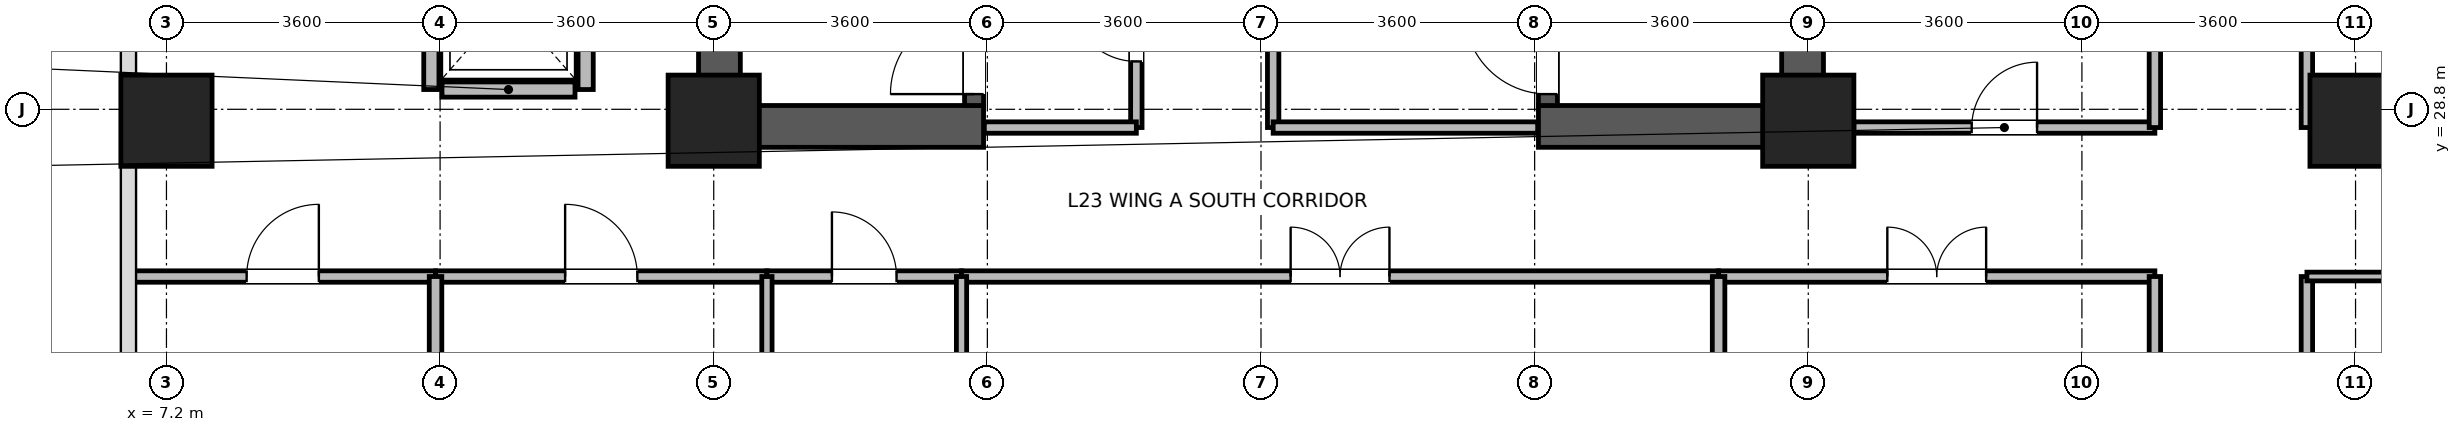
"""IFC4 building model, lengths in metres.
Left out: names, types, materials, properties, quantities, classifications, styles, units other than length and angle.
Written with IfcOpenShell. Run it as: python <this file> out.ifc"""

import sys

from ifc_helpers import new_model, si_unit, direction, frame, frame_2d, origin, origin_2d, place, context, subcontext, project, spatial, rectangle, extrude, source, transform, mapped, element, fill, save


model = new_model("IFC4")
c1 = context("Model", 3, precision=1e-05, world=origin(), true_north=direction((0.0, 1.0)))
c2 = subcontext(c1, "Body", "Model", "MODEL_VIEW")
j1 = project(units=[si_unit("LENGTHUNIT", "METRE"), si_unit("PLANEANGLEUNIT", "RADIAN")], contexts=[c1])
p1 = place(None, origin())
s1 = spatial("IfcSite", under=j1, at=p1, CompositionType="ELEMENT")
p2 = place(p1, origin())
s2 = spatial("IfcBuilding", under=s1, at=p2, CompositionType="ELEMENT")
p3 = place(p2, frame((0.0, 0.0, 93.4)))
s3 = spatial("IfcBuildingStorey", under=s2, at=p3, CompositionType="ELEMENT", Elevation=93.4)
for number, where, z_axis, x_axis in (
    (1, (14.475, 28.3, 0.0), (0.0, 0.0, 1.0), (0.0, 1.0, 0.0)),
    (2, (28.725, 28.3, 0.0), (0.0, 0.0, 1.0), (0.0, 1.0, 0.0)),
):
    element("IfcWall", number, at=place(p3, frame(where, z_axis=z_axis, x_axis=x_axis)), inside=s3, PredefinedType="SHEAR", context=c2, shape_type="SweptSolid", body=[
        extrude(rectangle(XDim=8.1, YDim=0.55, at=frame_2d((4.05, 0.0))), origin(), (0.0, 0.0, 1.0), 3.45),
    ])
for number, where, z_axis, x_axis in (
    (3, (14.75, 28.575, 0.0), (0.0, 0.0, 1.0), (1.0, 0.0, 0.0)),
    (4, (25.25, 28.575, 0.0), (0.0, 0.0, 1.0), (1.0, 0.0, 0.0)),
):
    element("IfcWall", number, at=place(p3, frame(where, z_axis=z_axis, x_axis=x_axis)), inside=s3, PredefinedType="SHEAR", context=c2, shape_type="SweptSolid", body=[
        extrude(rectangle(XDim=3.2, YDim=0.55, at=frame_2d((1.6, 0.0))), origin(), (0.0, 0.0, 1.0), 3.45),
    ])
p4 = place(p3, frame((17.825, 28.85, 0.0), z_axis=(0.0, 0.0, 1.0), x_axis=(0.0, 1.0, 0.0)))
e5 = element("IfcWall", 5, at=p4, inside=s3, PredefinedType="SHEAR", context=c2, shape_type="SweptSolid", body=[
    extrude(rectangle(XDim=7.0, YDim=0.25, at=frame_2d((3.5, 0.0))), origin(), (0.0, 0.0, 1.0), 3.45),
])
p5 = place(p4, frame((0.15, 0.0, 0.0)))
e6 = element("IfcOpeningElement", 6, at=p5, cuts=e5, PredefinedType="OPENING", context=c2, shape_type="SweptSolid", body=[
    extrude(rectangle(XDim=1.1, YDim=2.08, at=frame_2d((0.55, 1.04))), frame((0.0, 0.135, 0.0), z_axis=(0.0, -1.0, 0.0), x_axis=(1.0, 0.0, 0.0)), (0.0, 0.0, 1.0), 0.27),
])
p6 = place(p3, frame((25.375, 28.85, 0.0), z_axis=(0.0, 0.0, 1.0), x_axis=(0.0, 1.0, 0.0)))
e7 = element("IfcWall", 7, at=p6, inside=s3, PredefinedType="SHEAR", context=c2, shape_type="SweptSolid", body=[
    extrude(rectangle(XDim=7.0, YDim=0.25, at=frame_2d((3.5, 0.0))), origin(), (0.0, 0.0, 1.0), 3.45),
])
p7 = place(p6, frame((0.15, 0.0, 0.0)))
e8 = element("IfcOpeningElement", 8, at=p7, cuts=e7, PredefinedType="OPENING", context=c2, shape_type="SweptSolid", body=[
    extrude(rectangle(XDim=1.1, YDim=2.08, at=frame_2d((0.55, 1.04))), frame((0.0, 0.135, 0.0), z_axis=(0.0, -1.0, 0.0), x_axis=(1.0, 0.0, 0.0)), (0.0, 0.0, 1.0), 0.27),
])
m1 = source(origin(), c2, "Body", "SweptSolid", [
    extrude(rectangle(XDim=1.2, YDim=1.2, at=origin_2d()), origin(), (0.0, 0.0, 1.0), 3.7),
])
for number, where, z_axis, x_axis in (
    (9, (7.2, 28.65, 0.0), (0.0, 0.0, 1.0), (1.0, 0.0, 0.0)),
    (10, (14.4, 28.65, 0.0), (0.0, 0.0, 1.0), (1.0, 0.0, 0.0)),
    (11, (28.8, 28.65, 0.0), (0.0, 0.0, 1.0), (1.0, 0.0, 0.0)),
    (12, (36.0, 28.65, 0.0), (0.0, 0.0, 1.0), (1.0, 0.0, 0.0)),
):
    element("IfcColumn", number, at=place(p3, frame(where, z_axis=z_axis, x_axis=x_axis)), inside=s3, PredefinedType="COLUMN", context=c2, shape_type="MappedRepresentation", body=[
        mapped(m1, transform((0.0, 0.0, 0.0), x_axis=(1.0, 0.0, 0.0), y_axis=(0.0, 1.0, 0.0), z_axis=(0.0, 0.0, 1.0), scale=1.0)),
    ])
p8 = place(p3, frame((10.825, 29.06, 0.0), z_axis=(0.0, 0.0, 1.0), x_axis=(1.0, 0.0, 0.0)))
e13 = element("IfcWall", 13, at=p8, inside=s3, PredefinedType="PARTITIONING", context=c2, shape_type="SweptSolid", body=[
    extrude(rectangle(XDim=1.75, YDim=0.2, at=frame_2d((0.875, 0.0))), origin(), (0.0, 0.0, 1.0), 3.43),
])
for number, where, z_axis, x_axis in (
    (14, (10.685, 29.06, 0.0), (0.0, 0.0, 1.0), (0.0, 1.0, 0.0)),
    (15, (12.715, 29.06, 0.0), (0.0, 0.0, 1.0), (0.0, 1.0, 0.0)),
):
    element("IfcWall", number, at=place(p3, frame(where, z_axis=z_axis, x_axis=x_axis)), inside=s3, PredefinedType="PARTITIONING", context=c2, shape_type="SweptSolid", body=[
        extrude(rectangle(XDim=2.28, YDim=0.2, at=frame_2d((1.14, 0.0))), origin(), (0.0, 0.0, 1.0), 3.43),
    ])
p9 = place(p3, frame((17.66, 26.6, 0.0), z_axis=(0.0, 0.0, 1.0), x_axis=(1.0, 0.0, 0.0)))
e16 = element("IfcWall", 16, at=p9, inside=s3, PredefinedType="PARTITIONING", context=c2, shape_type="SweptSolid", body=[
    extrude(rectangle(XDim=9.96, YDim=0.15, at=frame_2d((4.98, 0.0))), origin(), (0.0, 0.0, 1.0), 3.43),
])
p10 = place(p9, frame((4.33, 0.0, 0.0)))
e17 = element("IfcOpeningElement", 17, at=p10, cuts=e16, PredefinedType="OPENING", context=c2, shape_type="SweptSolid", body=[
    extrude(rectangle(XDim=1.3, YDim=2.12, at=frame_2d((0.65, 1.06))), frame((0.0, 0.085, 0.0), z_axis=(0.0, -1.0, 0.0), x_axis=(1.0, 0.0, 0.0)), (0.0, 0.0, 1.0), 0.17),
])
p11 = place(p3, frame((35.36, 16.96, 0.0), z_axis=(0.0, 0.0, 1.0), x_axis=(0.0, 1.0, 0.0)))
e18 = element("IfcWall", 18, at=p11, inside=s3, PredefinedType="PARTITIONING", context=c2, shape_type="SweptSolid", body=[
    extrude(rectangle(XDim=9.64, YDim=0.15, at=frame_2d((4.82, 0.0))), origin(), (0.0, 0.0, 1.0), 3.43),
])
p12 = place(p11, frame((2.435, 0.0, 0.0)))
e19 = element("IfcOpeningElement", 19, at=p12, cuts=e18, PredefinedType="OPENING", context=c2, shape_type="SweptSolid", body=[
    extrude(rectangle(XDim=1.3, YDim=2.12, at=frame_2d((0.65, 1.06))), frame((0.0, 0.085, 0.0), z_axis=(0.0, -1.0, 0.0), x_axis=(1.0, 0.0, 0.0)), (0.0, 0.0, 1.0), 0.17),
])
p13 = place(p3, frame((35.36, 28.56, 0.0), z_axis=(0.0, 0.0, 1.0), x_axis=(0.0, 1.0, 0.0)))
e20 = element("IfcWall", 20, at=p13, inside=s3, PredefinedType="PARTITIONING", context=c2, shape_type="SweptSolid", body=[
    extrude(rectangle(XDim=7.68, YDim=0.15, at=frame_2d((3.84, 0.0))), origin(), (0.0, 0.0, 1.0), 3.43),
])
p14 = place(p13, frame((3.19, 0.0, 0.0)))
e21 = element("IfcOpeningElement", 21, at=p14, cuts=e20, PredefinedType="OPENING", context=c2, shape_type="SweptSolid", body=[
    extrude(rectangle(XDim=1.3, YDim=2.12, at=frame_2d((0.65, 1.06))), frame((0.0, 0.085, 0.0), z_axis=(0.0, -1.0, 0.0), x_axis=(1.0, 0.0, 0.0)), (0.0, 0.0, 1.0), 0.17),
])
p15 = place(p3, frame((27.62, 26.6, 0.0), z_axis=(0.0, 0.0, 1.0), x_axis=(1.0, 0.0, 0.0)))
e22 = element("IfcWall", 22, at=p15, inside=s3, PredefinedType="PARTITIONING", context=c2, shape_type="SweptSolid", body=[
    extrude(rectangle(XDim=5.74, YDim=0.15, at=frame_2d((2.87, 0.0))), origin(), (0.0, 0.0, 1.0), 3.43),
])
p16 = place(p15, frame((2.22, 0.0, 0.0)))
e23 = element("IfcOpeningElement", 23, at=p16, cuts=e22, PredefinedType="OPENING", context=c2, shape_type="SweptSolid", body=[
    extrude(rectangle(XDim=1.3, YDim=2.12, at=frame_2d((0.65, 1.06))), frame((0.0, 0.085, 0.0), z_axis=(0.0, -1.0, 0.0), x_axis=(1.0, 0.0, 0.0)), (0.0, 0.0, 1.0), 0.17),
])
p17 = place(p3, frame((33.36, 21.6, 0.0), z_axis=(0.0, 0.0, 1.0), x_axis=(0.0, 1.0, 0.0)))
e24 = element("IfcWall", 24, at=p17, inside=s3, PredefinedType="PARTITIONING", context=c2, shape_type="SweptSolid", body=[
    extrude(rectangle(XDim=5.0, YDim=0.15, at=frame_2d((2.5, 0.0))), origin(), (0.0, 0.0, 1.0), 3.43),
])
p18 = place(p3, frame((29.4, 28.56, 0.0), z_axis=(0.0, 0.0, 1.0), x_axis=(1.0, 0.0, 0.0)))
e25 = element("IfcWall", 25, at=p18, inside=s3, PredefinedType="PARTITIONING", context=c2, shape_type="SweptSolid", body=[
    extrude(rectangle(XDim=3.96, YDim=0.15, at=frame_2d((1.98, 0.0))), origin(), (0.0, 0.0, 1.0), 2.78),
])
p19 = place(p18, frame((1.55, 0.0, 0.0)))
e26 = element("IfcOpeningElement", 26, at=p19, cuts=e25, PredefinedType="OPENING", context=c2, shape_type="SweptSolid", body=[
    extrude(rectangle(XDim=0.86, YDim=2.02, at=frame_2d((0.43, 1.01))), frame((0.0, 0.085, 0.0), z_axis=(0.0, -1.0, 0.0), x_axis=(1.0, 0.0, 0.0)), (0.0, 0.0, 1.0), 0.17),
])
p20 = place(p3, frame((10.74, 26.6, 0.0), z_axis=(0.0, 0.0, 1.0), x_axis=(1.0, 0.0, 0.0)))
e27 = element("IfcWall", 27, at=p20, inside=s3, PredefinedType="PARTITIONING", context=c2, shape_type="SweptSolid", body=[
    extrude(rectangle(XDim=4.36, YDim=0.15, at=frame_2d((2.18, 0.0))), origin(), (0.0, 0.0, 1.0), 3.43),
])
p21 = place(p20, frame((1.705, 0.0, 0.0)))
e28 = element("IfcOpeningElement", 28, at=p21, cuts=e27, PredefinedType="OPENING", context=c2, shape_type="SweptSolid", body=[
    extrude(rectangle(XDim=0.95, YDim=2.1, at=frame_2d((0.475, 1.05))), frame((0.0, 0.085, 0.0), z_axis=(0.0, -1.0, 0.0), x_axis=(1.0, 0.0, 0.0)), (0.0, 0.0, 1.0), 0.17),
])
p22 = place(p3, frame((6.72, 26.6, 0.0), z_axis=(0.0, 0.0, 1.0), x_axis=(1.0, 0.0, 0.0)))
e29 = element("IfcWall", 29, at=p22, inside=s3, PredefinedType="PARTITIONING", context=c2, shape_type="SweptSolid", body=[
    extrude(rectangle(XDim=4.02, YDim=0.15, at=frame_2d((2.01, 0.0))), origin(), (0.0, 0.0, 1.0), 3.43),
])
p23 = place(p22, frame((1.535, 0.0, 0.0)))
e30 = element("IfcOpeningElement", 30, at=p23, cuts=e29, PredefinedType="OPENING", context=c2, shape_type="SweptSolid", body=[
    extrude(rectangle(XDim=0.95, YDim=2.1, at=frame_2d((0.475, 1.05))), frame((0.0, 0.085, 0.0), z_axis=(0.0, -1.0, 0.0), x_axis=(1.0, 0.0, 0.0)), (0.0, 0.0, 1.0), 0.17),
])
p24 = place(p3, frame((33.36, 28.56, 0.0), z_axis=(0.0, 0.0, 1.0), x_axis=(0.0, 1.0, 0.0)))
e31 = element("IfcWall", 31, at=p24, inside=s3, PredefinedType="PARTITIONING", context=c2, shape_type="SweptSolid", body=[
    extrude(rectangle(XDim=3.84, YDim=0.15, at=frame_2d((1.92, 0.0))), origin(), (0.0, 0.0, 1.0), 3.43),
])
p25 = place(p3, frame((19.96, 28.56, 0.0), z_axis=(0.0, 0.0, 1.0), x_axis=(0.0, 1.0, 0.0)))
e32 = element("IfcWall", 32, at=p25, inside=s3, PredefinedType="PARTITIONING", context=c2, shape_type="SweptSolid", body=[
    extrude(rectangle(XDim=2.6, YDim=0.15, at=frame_2d((1.3, 0.0))), origin(), (0.0, 0.0, 1.0), 3.43),
])
p26 = place(p25, frame((0.87, 0.0, 0.0)))
e33 = element("IfcOpeningElement", 33, at=p26, cuts=e32, PredefinedType="OPENING", context=c2, shape_type="SweptSolid", body=[
    extrude(rectangle(XDim=0.86, YDim=2.02, at=frame_2d((0.43, 1.01))), frame((0.0, 0.085, 0.0), z_axis=(0.0, -1.0, 0.0), x_axis=(1.0, 0.0, 0.0)), (0.0, 0.0, 1.0), 0.17),
])
p27 = place(p3, frame((15.1, 26.6, 0.0), z_axis=(0.0, 0.0, 1.0), x_axis=(1.0, 0.0, 0.0)))
e34 = element("IfcWall", 34, at=p27, inside=s3, PredefinedType="PARTITIONING", context=c2, shape_type="SweptSolid", body=[
    extrude(rectangle(XDim=2.56, YDim=0.15, at=frame_2d((1.28, 0.0))), origin(), (0.0, 0.0, 1.0), 3.43),
])
p28 = place(p27, frame((0.855, 0.0, 0.0)))
e35 = element("IfcOpeningElement", 35, at=p28, cuts=e34, PredefinedType="OPENING", context=c2, shape_type="SweptSolid", body=[
    extrude(rectangle(XDim=0.85, YDim=2.04, at=frame_2d((0.425, 1.02))), frame((0.0, 0.085, 0.0), z_axis=(0.0, -1.0, 0.0), x_axis=(1.0, 0.0, 0.0)), (0.0, 0.0, 1.0), 0.17),
])
p29 = place(p3, frame((17.96, 28.56, 0.0), z_axis=(0.0, 0.0, 1.0), x_axis=(1.0, 0.0, 0.0)))
e36 = element("IfcWall", 36, at=p29, inside=s3, PredefinedType="PARTITIONING", context=c2, shape_type="SweptSolid", body=[
    extrude(rectangle(XDim=2.0, YDim=0.15, at=frame_2d((1.0, 0.0))), origin(), (0.0, 0.0, 1.0), 2.23),
])
p30 = place(p3, frame((10.74, 21.732, 0.0), z_axis=(0.0, 0.0, 1.0), x_axis=(0.0, 1.0, 0.0)))
e37 = element("IfcWall", 37, at=p30, inside=s3, PredefinedType="PARTITIONING", context=c2, shape_type="SweptSolid", body=[
    extrude(rectangle(XDim=4.868, YDim=0.165, at=frame_2d((2.434, 0.0))), origin(), (0.0, 0.0, 1.0), 3.43),
])
for number, where, z_axis, x_axis in (
    (38, (15.1, 21.732, 0.0), (0.0, 0.0, 1.0), (0.0, 1.0, 0.0)),
    (39, (17.66, 21.732, 0.0), (0.0, 0.0, 1.0), (0.0, 1.0, 0.0)),
):
    element("IfcWall", number, at=place(p3, frame(where, z_axis=z_axis, x_axis=x_axis)), inside=s3, PredefinedType="PARTITIONING", context=c2, shape_type="SweptSolid", body=[
        extrude(rectangle(XDim=4.868, YDim=0.135, at=frame_2d((2.434, 0.0))), origin(), (0.0, 0.0, 1.0), 3.43),
    ])
p31 = place(p3, frame((27.62, 21.732, 0.0), z_axis=(0.0, 0.0, 1.0), x_axis=(0.0, 1.0, 0.0)))
e40 = element("IfcWall", 40, at=p31, inside=s3, PredefinedType="PARTITIONING", context=c2, shape_type="SweptSolid", body=[
    extrude(rectangle(XDim=4.868, YDim=0.165, at=frame_2d((2.434, 0.0))), origin(), (0.0, 0.0, 1.0), 3.43),
])
p32 = place(p3, frame((21.76, 28.56, 0.0), z_axis=(0.0, 0.0, 1.0), x_axis=(0.0, 1.0, 0.0)))
e41 = element("IfcWall", 41, at=p32, inside=s3, PredefinedType="PARTITIONING", context=c2, shape_type="SweptSolid", body=[
    extrude(rectangle(XDim=4.6, YDim=0.15, at=frame_2d((2.3, 0.0))), origin(), (0.0, 0.0, 1.0), 3.43),
])
p33 = place(p32, frame((1.55, 0.0, 0.0)))
e42 = element("IfcOpeningElement", 42, at=p33, cuts=e41, PredefinedType="OPENING", context=c2, shape_type="SweptSolid", body=[
    extrude(rectangle(XDim=1.5, YDim=2.1, at=frame_2d((0.75, 1.05))), frame((0.0, 0.085, 0.0), z_axis=(0.0, -1.0, 0.0), x_axis=(1.0, 0.0, 0.0)), (0.0, 0.0, 1.0), 0.17),
])
p34 = place(p3, frame((35.36, 26.6, 0.0), z_axis=(0.0, 0.0, 1.0), x_axis=(1.0, 0.0, 0.0)))
e43 = element("IfcWall", 43, at=p34, inside=s3, PredefinedType="PARTITIONING", context=c2, shape_type="SweptSolid", body=[
    extrude(rectangle(XDim=4.18, YDim=0.115, at=frame_2d((2.09, 0.0))), origin(), (0.0, 0.0, 1.0), 3.43),
])
p35 = place(p3, frame((21.76, 28.56, 0.0), z_axis=(0.0, 0.0, 1.0), x_axis=(1.0, 0.0, 0.0)))
e44 = element("IfcWall", 44, at=p35, inside=s3, PredefinedType="PARTITIONING", context=c2, shape_type="SweptSolid", body=[
    extrude(rectangle(XDim=3.48, YDim=0.15, at=frame_2d((1.74, 0.0))), origin(), (0.0, 0.0, 1.0), 2.23),
])
p36 = place(p5, origin())
e45 = element("IfcDoor", 45, at=p36, inside=s3, OperationType="SINGLE_SWING_LEFT", PredefinedType="DOOR", context=c2, shape_type="SweptSolid", body=[
    extrude(rectangle(XDim=1.1, YDim=2.08, at=frame_2d((0.55, 1.04))), frame((0.0, 0.025, 0.0), z_axis=(0.0, -1.0, 0.0), x_axis=(1.0, 0.0, 0.0)), (0.0, 0.0, 1.0), 0.05),
])
fill(e6, e45)
p37 = place(p7, origin())
e46 = element("IfcDoor", 46, at=p37, inside=s3, OperationType="SINGLE_SWING_RIGHT", PredefinedType="DOOR", context=c2, shape_type="SweptSolid", body=[
    extrude(rectangle(XDim=1.1, YDim=2.08, at=frame_2d((0.55, 1.04))), frame((0.0, 0.025, 0.0), z_axis=(0.0, -1.0, 0.0), x_axis=(1.0, 0.0, 0.0)), (0.0, 0.0, 1.0), 0.05),
])
fill(e8, e46)
p38 = place(p10, origin())
e47 = element("IfcDoor", 47, at=p38, inside=s3, OperationType="DOUBLE_DOOR_SINGLE_SWING", PredefinedType="DOOR", context=c2, shape_type="SweptSolid", body=[
    extrude(rectangle(XDim=1.3, YDim=2.12, at=frame_2d((0.65, 1.06))), frame((0.0, 0.025, 0.0), z_axis=(0.0, -1.0, 0.0), x_axis=(1.0, 0.0, 0.0)), (0.0, 0.0, 1.0), 0.05),
])
fill(e17, e47)
p39 = place(p16, origin())
e48 = element("IfcDoor", 48, at=p39, inside=s3, OperationType="DOUBLE_DOOR_SINGLE_SWING", PredefinedType="DOOR", context=c2, shape_type="SweptSolid", body=[
    extrude(rectangle(XDim=1.3, YDim=2.12, at=frame_2d((0.65, 1.06))), frame((0.0, 0.025, 0.0), z_axis=(0.0, -1.0, 0.0), x_axis=(1.0, 0.0, 0.0)), (0.0, 0.0, 1.0), 0.05),
])
fill(e23, e48)
p40 = place(p19, origin())
e49 = element("IfcDoor", 49, at=p40, inside=s3, OperationType="SINGLE_SWING_RIGHT", PredefinedType="DOOR", context=c2, shape_type="SweptSolid", body=[
    extrude(rectangle(XDim=0.86, YDim=2.02, at=frame_2d((0.43, 1.01))), frame((0.0, 0.025, 0.0), z_axis=(0.0, -1.0, 0.0), x_axis=(1.0, 0.0, 0.0)), (0.0, 0.0, 1.0), 0.05),
])
fill(e26, e49)
p41 = place(p21, origin())
e50 = element("IfcDoor", 50, at=p41, inside=s3, OperationType="SINGLE_SWING_LEFT", PredefinedType="DOOR", context=c2, shape_type="SweptSolid", body=[
    extrude(rectangle(XDim=0.95, YDim=2.1, at=frame_2d((0.475, 1.05))), frame((0.0, 0.025, 0.0), z_axis=(0.0, -1.0, 0.0), x_axis=(1.0, 0.0, 0.0)), (0.0, 0.0, 1.0), 0.05),
])
fill(e28, e50)
p42 = place(p23, origin())
e51 = element("IfcDoor", 51, at=p42, inside=s3, OperationType="SINGLE_SWING_RIGHT", PredefinedType="DOOR", context=c2, shape_type="SweptSolid", body=[
    extrude(rectangle(XDim=0.95, YDim=2.1, at=frame_2d((0.475, 1.05))), frame((0.0, 0.025, 0.0), z_axis=(0.0, -1.0, 0.0), x_axis=(1.0, 0.0, 0.0)), (0.0, 0.0, 1.0), 0.05),
])
fill(e30, e51)
p43 = place(p26, origin())
e52 = element("IfcDoor", 52, at=p43, inside=s3, OperationType="SINGLE_SWING_RIGHT", PredefinedType="DOOR", context=c2, shape_type="SweptSolid", body=[
    extrude(rectangle(XDim=0.86, YDim=2.02, at=frame_2d((0.43, 1.01))), frame((0.0, 0.025, 0.0), z_axis=(0.0, -1.0, 0.0), x_axis=(1.0, 0.0, 0.0)), (0.0, 0.0, 1.0), 0.05),
])
fill(e33, e52)
p44 = place(p28, origin())
e53 = element("IfcDoor", 53, at=p44, inside=s3, OperationType="SINGLE_SWING_LEFT", PredefinedType="DOOR", context=c2, shape_type="SweptSolid", body=[
    extrude(rectangle(XDim=0.85, YDim=2.04, at=frame_2d((0.425, 1.02))), frame((0.0, 0.025, 0.0), z_axis=(0.0, -1.0, 0.0), x_axis=(1.0, 0.0, 0.0)), (0.0, 0.0, 1.0), 0.05),
])
fill(e35, e53)
save(model, sys.argv[1])
